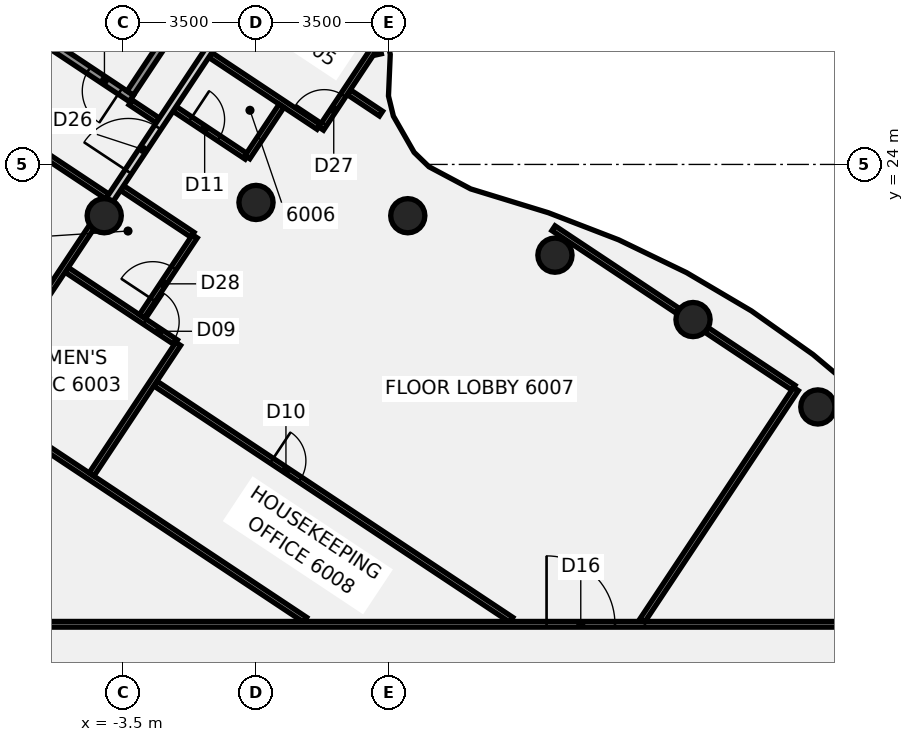
"""IFC4 building model, lengths in metres.
Left out: names, types, materials, properties, quantities, classifications, styles, units other than length and angle.
Written with IfcOpenShell. Run it as: python <this file> out.ifc"""

import sys

from ifc_helpers import new_model, si_unit, direction, frame, frame_2d, origin, origin_2d, place, context, subcontext, project, spatial, rectangle, circle, extrude, element, fill, save


model = new_model("IFC4")
c1 = context("Model", 3, precision=1e-05, world=origin(), true_north=direction((0.0, 1.0)))
c2 = subcontext(c1, "Body", "Model", "MODEL_VIEW")
j1 = project(units=[si_unit("LENGTHUNIT", "METRE"), si_unit("PLANEANGLEUNIT", "RADIAN")], contexts=[c1])
p1 = place(None, origin())
s1 = spatial("IfcSite", under=j1, at=p1, CompositionType="ELEMENT")
p2 = place(p1, origin())
s2 = spatial("IfcBuilding", under=s1, at=p2, CompositionType="ELEMENT")
p3 = place(p2, frame((0.0, 0.0, 237.9)))
s3 = spatial("IfcBuildingStorey", under=s2, at=p3, CompositionType="ELEMENT", Elevation=237.9)
for number, where, z_axis, x_axis in (
    (1, (14.784, 17.619, -0.14), (0.0, 0.0, 1.0), (1.0, 0.0, 0.0)),
    (2, (11.5, 19.919, -0.14), (0.0, 0.0, 1.0), (1.0, 0.0, 0.0)),
    (3, (7.866, 21.613, -0.14), (0.0, 0.0, 1.0), (1.0, 0.0, 0.0)),
    (4, (3.994, 22.651, -0.14), (0.0, 0.0, 1.0), (1.0, 0.0, 0.0)),
    (5, (0.0, 23.0, -0.14), (0.0, 0.0, 1.0), (1.0, 0.0, 0.0)),
    (6, (-3.994, 22.651, -0.14), (0.0, 0.0, 1.0), (1.0, 0.0, 0.0)),
):
    element("IfcColumn", number, at=place(p3, frame(where, z_axis=z_axis, x_axis=x_axis)), inside=s3, PredefinedType="COLUMN", context=c2, shape_type="SweptSolid", body=[
        extrude(circle(Radius=0.45, at=origin_2d()), origin(), (0.0, 0.0, 1.0), 3.6),
    ])
p4 = place(p3, frame((-15.01, 30.525, 0.0), z_axis=(0.0, 0.0, 1.0), x_axis=(0.833117507286, -0.553096030589, 0.0)))
e7 = element("IfcWall", 7, at=p4, inside=s3, PredefinedType="PARTITIONING", context=c2, shape_type="SweptSolid", body=[
    extrude(rectangle(XDim=13.32, YDim=0.15, at=frame_2d((6.66, 0.0))), origin(), (0.0, 0.0, 1.0), 2.864),
])
p5 = place(p4, frame((8.569, 0.0, 0.0)))
e8 = element("IfcOpeningElement", 8, at=p5, cuts=e7, PredefinedType="OPENING", context=c2, shape_type="SweptSolid", body=[
    extrude(rectangle(XDim=0.9, YDim=2.1, at=frame_2d((0.45, 1.05))), frame((0.0, 0.085, 0.0), z_axis=(0.0, -1.0, 0.0), x_axis=(1.0, 0.0, 0.0)), (0.0, 0.0, 1.0), 0.17),
])
p6 = place(p4, frame((0.52, 0.0, 0.0)))
e9 = element("IfcOpeningElement", 9, at=p6, cuts=e7, PredefinedType="OPENING", context=c2, shape_type="SweptSolid", body=[
    extrude(rectangle(XDim=0.9, YDim=2.1, at=frame_2d((0.45, 1.05))), frame((0.0, 0.085, 0.0), z_axis=(0.0, -1.0, 0.0), x_axis=(1.0, 0.0, 0.0)), (0.0, 0.0, 1.0), 0.17),
])
p7 = place(p3, frame((-3.302, 25.633, 0.0), z_axis=(0.0, 0.0, 1.0), x_axis=(0.833097223734, -0.553126582084, 0.0)))
e10 = element("IfcWall", 10, at=p7, inside=s3, PredefinedType="PARTITIONING", context=c2, shape_type="SweptSolid", body=[
    extrude(rectangle(XDim=0.86, YDim=0.15, at=frame_2d((0.43, 0.0))), origin(), (0.0, 0.0, 1.0), 2.864),
])
p8 = place(p3, frame((-13.717, 21.985, 0.0), z_axis=(0.0, 0.0, 1.0), x_axis=(0.833087033507, -0.553141929891, 0.0)))
e11 = element("IfcWall", 11, at=p8, inside=s3, PredefinedType="PARTITIONING", context=c2, shape_type="SweptSolid", body=[
    extrude(rectangle(XDim=18.017, YDim=0.15, at=frame_2d((9.008, 0.0))), origin(), (0.0, 0.0, 1.0), 2.864),
])
p9 = place(p3, frame((-4.979, 21.225, 0.0), z_axis=(0.0, 0.0, 1.0), x_axis=(0.833117303945, -0.553096336877, 0.0)))
e12 = element("IfcWall", 12, at=p9, inside=s3, PredefinedType="PARTITIONING", context=c2, shape_type="SweptSolid", body=[
    extrude(rectangle(XDim=3.445, YDim=0.15, at=frame_2d((1.722, 0.0))), origin(), (0.0, 0.0, 1.0), 2.864),
])
p10 = place(p9, frame((2.469, 0.0, 0.0)))
e13 = element("IfcOpeningElement", 13, at=p10, cuts=e12, PredefinedType="OPENING", context=c2, shape_type="SweptSolid", body=[
    extrude(rectangle(XDim=0.9, YDim=2.1, at=frame_2d((0.45, 1.05))), frame((0.0, 0.085, 0.0), z_axis=(0.0, -1.0, 0.0), x_axis=(1.0, 0.0, 0.0)), (0.0, 0.0, 1.0), 0.17),
])
p11 = place(p3, frame((-3.525, 23.38, 0.0), z_axis=(0.0, 0.0, 1.0), x_axis=(0.83314621035, -0.553052793302, 0.0)))
e14 = element("IfcWall", 14, at=p11, inside=s3, PredefinedType="PARTITIONING", context=c2, shape_type="SweptSolid", body=[
    extrude(rectangle(XDim=2.224, YDim=0.15, at=frame_2d((1.112, 0.0))), origin(), (0.0, 0.0, 1.0), 2.864),
])
p12 = place(p3, frame((-2.644, 18.234, 0.0), z_axis=(0.0, 0.0, 1.0), x_axis=(0.833101748675, -0.553119766737, 0.0)))
e15 = element("IfcWall", 15, at=p12, inside=s3, PredefinedType="PARTITIONING", context=c2, shape_type="SweptSolid", body=[
    extrude(rectangle(XDim=11.236, YDim=0.15, at=frame_2d((5.618, 0.0))), origin(), (0.0, 0.0, 1.0), 2.864),
])
p13 = place(p12, frame((3.67, 0.0, 0.0)))
e16 = element("IfcOpeningElement", 16, at=p13, cuts=e15, PredefinedType="OPENING", context=c2, shape_type="SweptSolid", body=[
    extrude(rectangle(XDim=0.9, YDim=2.1, at=frame_2d((0.45, 1.05))), frame((0.0, 0.085, 0.0), z_axis=(0.0, -1.0, 0.0), x_axis=(1.0, 0.0, 0.0)), (0.0, 0.0, 1.0), 0.17),
])
p14 = place(p3, frame((-2.138, 25.46, 0.0), z_axis=(0.0, 0.0, 1.0), x_axis=(0.833269970846, -0.552866309053, 0.0)))
e17 = element("IfcWall", 17, at=p14, inside=s3, PredefinedType="PARTITIONING", context=c2, shape_type="SweptSolid", body=[
    extrude(rectangle(XDim=2.275, YDim=0.15, at=frame_2d((1.138, 0.0))), origin(), (0.0, 0.0, 1.0), 2.864),
])
p15 = place(p14, frame((0.495, 0.0, 0.0)))
e18 = element("IfcOpeningElement", 18, at=p15, cuts=e17, PredefinedType="OPENING", context=c2, shape_type="SweptSolid", body=[
    extrude(rectangle(XDim=0.9, YDim=2.1, at=frame_2d((0.45, 1.05))), frame((0.0, 0.085, 0.0), z_axis=(0.0, -1.0, 0.0), x_axis=(1.0, 0.0, 0.0)), (0.0, 0.0, 1.0), 0.17),
])
p16 = place(p3, frame((-1.202, 26.879, 0.0), z_axis=(0.0, 0.0, 1.0), x_axis=(0.8331360396, -0.55306811472, 0.0)))
e19 = element("IfcWall", 19, at=p16, inside=s3, PredefinedType="PARTITIONING", context=c2, shape_type="SweptSolid", body=[
    extrude(rectangle(XDim=3.42, YDim=0.15, at=frame_2d((1.71, 0.0))), origin(), (0.0, 0.0, 1.0), 2.864),
])
p17 = place(p3, frame((2.445, 25.899, 0.0), z_axis=(0.0, 0.0, 1.0), x_axis=(0.832974807339, -0.553310916519, 0.0)))
e20 = element("IfcWall", 20, at=p17, inside=s3, PredefinedType="PARTITIONING", context=c2, shape_type="SweptSolid", body=[
    extrude(rectangle(XDim=1.014, YDim=0.15, at=frame_2d((0.507, 0.0))), origin(), (0.0, 0.0, 1.0), 2.864),
])
p18 = place(p3, frame((7.828, 22.322, 0.0), z_axis=(0.0, 0.0, 1.0), x_axis=(0.832880849794, -0.553452337646, 0.0)))
e21 = element("IfcWall", 21, at=p18, inside=s3, PredefinedType="PARTITIONING", context=c2, shape_type="SweptSolid", body=[
    extrude(rectangle(XDim=3.93, YDim=0.15, at=frame_2d((1.965, 0.0))), origin(), (0.0, 0.0, 1.0), 2.864),
])
p19 = place(p3, frame((11.855, 19.646, 0.0), z_axis=(0.0, 0.0, 1.0), x_axis=(0.832883714018, -0.553448027302, 0.0)))
e22 = element("IfcWall", 22, at=p19, inside=s3, PredefinedType="PARTITIONING", context=c2, shape_type="SweptSolid", body=[
    extrude(rectangle(XDim=2.746, YDim=0.15, at=frame_2d((1.373, 0.0))), origin(), (0.0, 0.0, 1.0), 2.864),
])
p20 = place(p3, frame((-17.065, 11.9, 0.0), z_axis=(0.0, 0.0, 1.0), x_axis=(1.0, 0.0, 0.0)))
e23 = element("IfcWall", 23, at=p20, inside=s3, PredefinedType="PARTITIONING", context=c2, shape_type="SweptSolid", body=[
    extrude(rectangle(XDim=34.165, YDim=0.15, at=frame_2d((17.083, 0.0))), origin(), (0.0, 0.0, 1.0), 2.864),
])
p21 = place(p20, frame((24.711, 0.0, 0.0)))
e24 = element("IfcOpeningElement", 24, at=p21, cuts=e23, PredefinedType="OPENING", context=c2, shape_type="SweptSolid", body=[
    extrude(rectangle(XDim=1.8, YDim=2.1, at=frame_2d((0.9, 1.05))), frame((0.0, 0.085, 0.0), z_axis=(0.0, -1.0, 0.0), x_axis=(1.0, 0.0, 0.0)), (0.0, 0.0, 1.0), 0.17),
])
p22 = place(p20, frame((9.652, 0.0, 0.0)))
e25 = element("IfcOpeningElement", 25, at=p22, cuts=e23, PredefinedType="OPENING", context=c2, shape_type="SweptSolid", body=[
    extrude(rectangle(XDim=1.8, YDim=2.1, at=frame_2d((0.9, 1.05))), frame((0.0, 0.085, 0.0), z_axis=(0.0, -1.0, 0.0), x_axis=(1.0, 0.0, 0.0)), (0.0, 0.0, 1.0), 0.17),
])
p23 = place(p20, frame((2.602, 0.0, 0.0)))
e26 = element("IfcOpeningElement", 26, at=p23, cuts=e23, PredefinedType="OPENING", context=c2, shape_type="SweptSolid", body=[
    extrude(rectangle(XDim=1.8, YDim=2.1, at=frame_2d((0.9, 1.05))), frame((0.0, 0.085, 0.0), z_axis=(0.0, -1.0, 0.0), x_axis=(1.0, 0.0, 0.0)), (0.0, 0.0, 1.0), 0.17),
])
p24 = place(p3, frame((-7.325, 17.837, 0.0), z_axis=(0.0, 0.0, 1.0), x_axis=(0.553097438288, 0.833116572731, 0.0)))
e27 = element("IfcWall", 27, at=p24, inside=s3, PredefinedType="PARTITIONING", context=c2, shape_type="SweptSolid", body=[
    extrude(rectangle(XDim=5.628, YDim=0.15, at=frame_2d((2.814, 0.0))), origin(), (0.0, 0.0, 1.0), 2.864),
])
p25 = place(p3, frame((-3.963, 22.9, 0.0), z_axis=(0.0, 0.0, 1.0), x_axis=(0.553100489326, 0.833114547171, 0.0)))
e28 = element("IfcWall", 28, at=p25, inside=s3, PredefinedType="PARTITIONING", context=c2, shape_type="SweptSolid", body=[
    extrude(rectangle(XDim=8.141, YDim=0.2, at=frame_2d((4.07, 0.0))), origin(), (0.0, 0.0, 1.0), 2.864),
])
p26 = place(p25, frame((1.092, 0.0, 0.0)))
e29 = element("IfcOpeningElement", 29, at=p26, cuts=e28, PredefinedType="OPENING", context=c2, shape_type="SweptSolid", body=[
    extrude(rectangle(XDim=1.4, YDim=2.1, at=frame_2d((0.7, 1.05))), frame((0.0, 0.11, 0.0), z_axis=(0.0, -1.0, 0.0), x_axis=(1.0, 0.0, 0.0)), (0.0, 0.0, 1.0), 0.22),
])
p27 = place(p3, frame((-4.326, 15.846, 0.0), z_axis=(0.0, 0.0, 1.0), x_axis=(0.55307176982, 0.83313361319, 0.0)))
e30 = element("IfcWall", 30, at=p27, inside=s3, PredefinedType="PARTITIONING", context=c2, shape_type="SweptSolid", body=[
    extrude(rectangle(XDim=4.12, YDim=0.15, at=frame_2d((2.06, 0.0))), origin(), (0.0, 0.0, 1.0), 2.864),
])
p28 = place(p3, frame((1.714, 24.943, 0.0), z_axis=(0.0, 0.0, 1.0), x_axis=(0.55306516675, 0.833137996569, 0.0)))
e31 = element("IfcWall", 31, at=p28, inside=s3, PredefinedType="PARTITIONING", context=c2, shape_type="SweptSolid", body=[
    extrude(rectangle(XDim=2.483, YDim=0.15, at=frame_2d((1.241, 0.0))), origin(), (0.0, 0.0, 1.0), 2.864),
])
p29 = place(p28, frame((0.15, 0.0, 0.0)))
e32 = element("IfcOpeningElement", 32, at=p29, cuts=e31, PredefinedType="OPENING", context=c2, shape_type="SweptSolid", body=[
    extrude(rectangle(XDim=0.9, YDim=2.1, at=frame_2d((0.45, 1.05))), frame((0.0, 0.085, 0.0), z_axis=(0.0, -1.0, 0.0), x_axis=(1.0, 0.0, 0.0)), (0.0, 0.0, 1.0), 0.17),
])
p30 = place(p3, frame((-3.003, 20.009, 0.0), z_axis=(0.0, 0.0, 1.0), x_axis=(0.553111776715, 0.83310705342, 0.0)))
e33 = element("IfcWall", 33, at=p30, inside=s3, PredefinedType="PARTITIONING", context=c2, shape_type="SweptSolid", body=[
    extrude(rectangle(XDim=2.52, YDim=0.15, at=frame_2d((1.26, 0.0))), origin(), (0.0, 0.0, 1.0), 2.864),
])
p31 = place(p30, frame((0.52, 0.0, 0.0)))
e34 = element("IfcOpeningElement", 34, at=p31, cuts=e33, PredefinedType="OPENING", context=c2, shape_type="SweptSolid", body=[
    extrude(rectangle(XDim=1.0, YDim=2.1, at=frame_2d((0.5, 1.05))), frame((0.0, 0.085, 0.0), z_axis=(0.0, -1.0, 0.0), x_axis=(1.0, 0.0, 0.0)), (0.0, 0.0, 1.0), 0.17),
])
p32 = place(p3, frame((-0.226, 24.191, 0.0), z_axis=(0.0, 0.0, 1.0), x_axis=(0.55306417873, 0.83313865245, 0.0)))
e35 = element("IfcWall", 35, at=p32, inside=s3, PredefinedType="PARTITIONING", context=c2, shape_type="SweptSolid", body=[
    extrude(rectangle(XDim=1.62, YDim=0.15, at=frame_2d((0.81, 0.0))), origin(), (0.0, 0.0, 1.0), 2.864),
])
p33 = place(p3, frame((10.165, 12.0, 0.0), z_axis=(0.0, 0.0, 1.0), x_axis=(0.553118980709, 0.83310227054, 0.0)))
e36 = element("IfcWall", 36, at=p33, inside=s3, PredefinedType="PARTITIONING", context=c2, shape_type="SweptSolid", body=[
    extrude(rectangle(XDim=7.309, YDim=0.15, at=frame_2d((3.655, 0.0))), origin(), (0.0, 0.0, 1.0), 2.864),
])
p34 = place(p3, frame((3.226, 26.896, 0.0), z_axis=(0.0, 0.0, 1.0), x_axis=(-0.212429644331, 0.977176363923, 0.0)))
e37 = element("IfcWall", 37, at=p34, inside=s3, PredefinedType="PARTITIONING", context=c2, shape_type="SweptSolid", body=[
    extrude(rectangle(XDim=0.5, YDim=0.15, at=frame_2d((0.25, 0.0))), origin(), (0.0, 0.0, 1.0), 2.864),
])
p35 = place(p3, frame((-3.28, 25.738, -0.14), z_axis=(0.0, 0.0, 1.0), x_axis=(-0.833119462199, 0.553093085931, 0.0)))
e38 = element("IfcWall", 38, at=p35, inside=s3, PredefinedType="SHEAR", context=c2, shape_type="SweptSolid", body=[
    extrude(rectangle(XDim=6.7, YDim=0.2, at=frame_2d((3.35, 0.0))), origin(), (0.0, 0.0, 1.0), 3.004),
])
p36 = place(p35, frame((0.35, 0.0, 0.0)))
e39 = element("IfcOpeningElement", 39, at=p36, cuts=e38, PredefinedType="OPENING", context=c2, shape_type="SweptSolid", body=[
    extrude(rectangle(XDim=1.0, YDim=2.1, at=frame_2d((0.5, 1.05))), frame((0.0, 0.11, 0.0), z_axis=(0.0, -1.0, 0.0), x_axis=(1.0, 0.0, 0.0)), (0.0, 0.0, 1.0), 0.22),
])
p37 = place(p3, frame((-1.538, 28.542, -0.14), z_axis=(0.0, 0.0, 1.0), x_axis=(-0.553149828065, -0.833081789329, 0.0)))
e40 = element("IfcWall", 40, at=p37, inside=s3, PredefinedType="SHEAR", context=c2, shape_type="SweptSolid", body=[
    extrude(rectangle(XDim=3.2, YDim=0.2, at=frame_2d((1.6, 0.0))), origin(), (0.0, 0.0, 1.0), 3.6),
])
p38 = place(p10, frame((0.9, 0.0, 0.0), z_axis=(0.0, 0.0, 1.0), x_axis=(-1.0, 0.0, 0.0)))
e41 = element("IfcDoor", 41, at=p38, inside=s3, OperationType="SINGLE_SWING_RIGHT", PredefinedType="DOOR", context=c2, shape_type="SweptSolid", body=[
    extrude(rectangle(XDim=0.9, YDim=2.1, at=frame_2d((0.45, 1.05))), frame((0.0, 0.025, 0.0), z_axis=(0.0, -1.0, 0.0), x_axis=(1.0, 0.0, 0.0)), (0.0, 0.0, 1.0), 0.05),
])
fill(e13, e41)
p39 = place(p13, frame((0.9, 0.0, 0.0), z_axis=(0.0, 0.0, 1.0), x_axis=(-1.0, 0.0, 0.0)))
e42 = element("IfcDoor", 42, at=p39, inside=s3, OperationType="SINGLE_SWING_LEFT", PredefinedType="DOOR", context=c2, shape_type="SweptSolid", body=[
    extrude(rectangle(XDim=0.9, YDim=2.1, at=frame_2d((0.45, 1.05))), frame((0.0, 0.025, 0.0), z_axis=(0.0, -1.0, 0.0), x_axis=(1.0, 0.0, 0.0)), (0.0, 0.0, 1.0), 0.05),
])
fill(e16, e42)
p40 = place(p15, origin())
e43 = element("IfcDoor", 43, at=p40, inside=s3, OperationType="SINGLE_SWING_RIGHT", PredefinedType="DOOR", context=c2, shape_type="SweptSolid", body=[
    extrude(rectangle(XDim=0.9, YDim=2.1, at=frame_2d((0.45, 1.05))), frame((0.0, 0.025, 0.0), z_axis=(0.0, -1.0, 0.0), x_axis=(1.0, 0.0, 0.0)), (0.0, 0.0, 1.0), 0.05),
])
fill(e18, e43)
p41 = place(p21, frame((1.8, 0.0, 0.0), z_axis=(0.0, 0.0, 1.0), x_axis=(-1.0, 0.0, 0.0)))
e44 = element("IfcDoor", 44, at=p41, inside=s3, OperationType="DOUBLE_DOOR_SINGLE_SWING", PredefinedType="DOOR", context=c2, shape_type="SweptSolid", body=[
    extrude(rectangle(XDim=1.8, YDim=2.1, at=frame_2d((0.9, 1.05))), frame((0.0, 0.025, 0.0), z_axis=(0.0, -1.0, 0.0), x_axis=(1.0, 0.0, 0.0)), (0.0, 0.0, 1.0), 0.05),
])
fill(e24, e44)
p42 = place(p26, frame((1.4, 0.0, 0.0), z_axis=(0.0, 0.0, 1.0), x_axis=(-1.0, 0.0, 0.0)))
e45 = element("IfcDoor", 45, at=p42, inside=s3, OperationType="DOUBLE_DOOR_SINGLE_SWING", PredefinedType="DOOR", context=c2, shape_type="SweptSolid", body=[
    extrude(rectangle(XDim=1.4, YDim=2.1, at=frame_2d((0.7, 1.05))), frame((0.0, 0.025, 0.0), z_axis=(0.0, -1.0, 0.0), x_axis=(1.0, 0.0, 0.0)), (0.0, 0.0, 1.0), 0.05),
])
fill(e29, e45)
p43 = place(p29, origin())
e46 = element("IfcDoor", 46, at=p43, inside=s3, OperationType="SINGLE_SWING_RIGHT", PredefinedType="DOOR", context=c2, shape_type="SweptSolid", body=[
    extrude(rectangle(XDim=0.9, YDim=2.1, at=frame_2d((0.45, 1.05))), frame((0.0, 0.025, 0.0), z_axis=(0.0, -1.0, 0.0), x_axis=(1.0, 0.0, 0.0)), (0.0, 0.0, 1.0), 0.05),
])
fill(e32, e46)
p44 = place(p31, origin())
e47 = element("IfcDoor", 47, at=p44, inside=s3, OperationType="SINGLE_SWING_RIGHT", PredefinedType="DOOR", context=c2, shape_type="SweptSolid", body=[
    extrude(rectangle(XDim=1.0, YDim=2.1, at=frame_2d((0.5, 1.05))), frame((0.0, 0.025, 0.0), z_axis=(0.0, -1.0, 0.0), x_axis=(1.0, 0.0, 0.0)), (0.0, 0.0, 1.0), 0.05),
])
fill(e34, e47)
p45 = place(p36, origin())
e48 = element("IfcDoor", 48, at=p45, inside=s3, OperationType="SINGLE_SWING_LEFT", PredefinedType="DOOR", context=c2, shape_type="SweptSolid", body=[
    extrude(rectangle(XDim=1.0, YDim=2.1, at=frame_2d((0.5, 1.05))), frame((0.0, 0.025, 0.0), z_axis=(0.0, -1.0, 0.0), x_axis=(1.0, 0.0, 0.0)), (0.0, 0.0, 1.0), 0.05),
])
fill(e39, e48)
save(model, sys.argv[1])
